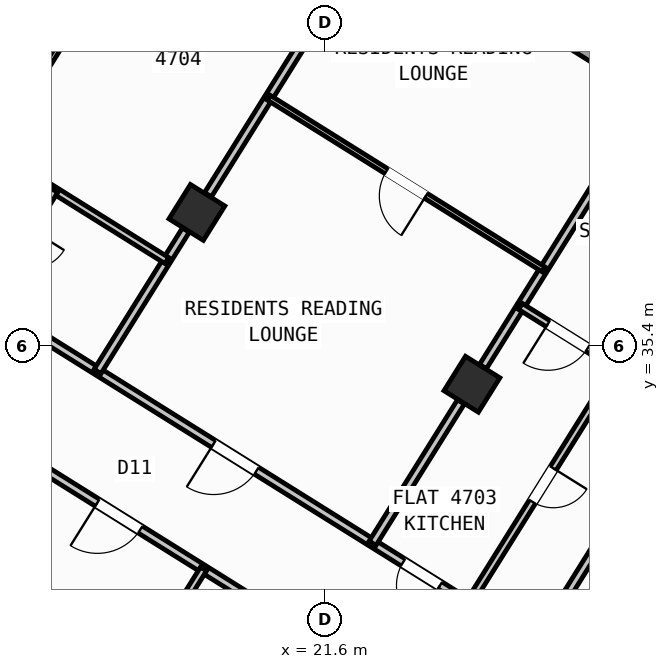
"""IFC4 building model, lengths in metres.
Left out: names, types, materials, properties, quantities, classifications, styles, units other than length and angle.
Written with IfcOpenShell. Run it as: python <this file> out.ifc"""

import sys

from ifc_helpers import new_model, si_unit, direction, frame, frame_2d, origin, origin_2d, place, context, subcontext, project, spatial, rectangle, hollow_rectangle, extrude, source, transform, mapped, element, fill, save


model = new_model("IFC4")
c1 = context("Model", 3, precision=1e-05, world=origin(), true_north=direction((0.0, 1.0)))
c2 = subcontext(c1, "Body", "Model", "MODEL_VIEW")
j1 = project(units=[si_unit("LENGTHUNIT", "METRE"), si_unit("PLANEANGLEUNIT", "RADIAN")], contexts=[c1])
p1 = place(None, origin())
s1 = spatial("IfcSite", under=j1, at=p1, CompositionType="ELEMENT")
p2 = place(p1, origin())
s2 = spatial("IfcBuilding", under=s1, at=p2, CompositionType="ELEMENT")
p3 = place(p2, frame((0.0, 0.0, 187.8)))
s3 = spatial("IfcBuildingStorey", under=s2, at=p3, CompositionType="ELEMENT", Elevation=187.8)
m1 = source(origin(), c2, "Body", "SweptSolid", [
    extrude(hollow_rectangle(XDim=0.8, YDim=0.8, WallThickness=0.032, at=origin_2d()), origin(), (0.0, 0.0, 1.0), 3.6),
])
for number, where, z_axis, x_axis in (
    (1, (24.5, 34.643, 0.0), (0.0, 0.0, 1.0), (-0.848, 0.53, 0.0)),
    (2, (19.073, 38.034, 0.0), (0.0, 0.0, 1.0), (-0.848, 0.53, 0.0)),
):
    element("IfcColumn", number, at=place(p3, frame(where, z_axis=z_axis, x_axis=x_axis)), inside=s3, PredefinedType="COLUMN", context=c2, shape_type="MappedRepresentation", body=[
        mapped(m1, transform((0.0, 0.0, 0.0), scale=1.0)),
    ])
p4 = place(p3, frame((5.7, 28.71, 0.0), z_axis=(0.0, 0.0, 1.0), x_axis=(0.529923711467, 0.8480453172, 0.0)))
e3 = element("IfcWall", 3, at=p4, inside=s3, PredefinedType="STANDARD", context=c2, shape_type="SweptSolid", body=[
    extrude(rectangle(XDim=21.587, YDim=0.32, at=frame_2d((10.794, 0.0))), origin(), (0.0, 0.0, 1.0), 2.825),
])
p5 = place(p4, frame((1.44, 0.0, 0.95)))
e4 = element("IfcOpeningElement", 4, at=p5, cuts=e3, PredefinedType="OPENING", context=c2, shape_type="SweptSolid", body=[
    extrude(rectangle(XDim=1.2, YDim=1.4, at=frame_2d((0.6, 0.7))), frame((0.0, 0.17, 0.0), z_axis=(0.0, -1.0, 0.0), x_axis=(1.0, 0.0, 0.0)), (0.0, 0.0, 1.0), 0.34),
])
p6 = place(p4, frame((4.545, 0.0, 0.85)))
e5 = element("IfcOpeningElement", 5, at=p6, cuts=e3, PredefinedType="OPENING", context=c2, shape_type="SweptSolid", body=[
    extrude(rectangle(XDim=1.8, YDim=1.5, at=frame_2d((0.9, 0.75))), frame((0.0, 0.17, 0.0), z_axis=(0.0, -1.0, 0.0), x_axis=(1.0, 0.0, 0.0)), (0.0, 0.0, 1.0), 0.34),
])
p7 = place(p4, frame((12.139, 0.0, 1.0)))
e6 = element("IfcOpeningElement", 6, at=p7, cuts=e3, PredefinedType="OPENING", context=c2, shape_type="SweptSolid", body=[
    extrude(rectangle(XDim=0.9, YDim=1.25, at=frame_2d((0.45, 0.625))), frame((0.0, 0.17, 0.0), z_axis=(0.0, -1.0, 0.0), x_axis=(1.0, 0.0, 0.0)), (0.0, 0.0, 1.0), 0.34),
])
p8 = place(p4, frame((16.35, 0.0, 0.95)))
e7 = element("IfcOpeningElement", 7, at=p8, cuts=e3, PredefinedType="OPENING", context=c2, shape_type="SweptSolid", body=[
    extrude(rectangle(XDim=1.2, YDim=1.4, at=frame_2d((0.6, 0.7))), frame((0.0, 0.17, 0.0), z_axis=(0.0, -1.0, 0.0), x_axis=(1.0, 0.0, 0.0)), (0.0, 0.0, 1.0), 0.34),
])
p9 = place(p4, frame((18.762, 0.0, 0.95)))
e8 = element("IfcOpeningElement", 8, at=p9, cuts=e3, PredefinedType="OPENING", context=c2, shape_type="SweptSolid", body=[
    extrude(rectangle(XDim=1.2, YDim=1.4, at=frame_2d((0.6, 0.7))), frame((0.0, 0.17, 0.0), z_axis=(0.0, -1.0, 0.0), x_axis=(1.0, 0.0, 0.0)), (0.0, 0.0, 1.0), 0.34),
])
p10 = place(p3, frame((17.424, 47.083, 0.0), z_axis=(0.0, 0.0, 1.0), x_axis=(0.848049927979, -0.529916332693, 0.0)))
e9 = element("IfcWall", 9, at=p10, inside=s3, PredefinedType="STANDARD", context=c2, shape_type="SweptSolid", body=[
    extrude(rectangle(XDim=29.223, YDim=0.32, at=frame_2d((14.612, 0.0))), origin(), (0.0, 0.0, 1.0), 3.35),
])
p11 = place(p10, frame((3.764, 0.0, 0.0)))
e10 = element("IfcOpeningElement", 10, at=p11, cuts=e9, PredefinedType="OPENING", context=c2, shape_type="SweptSolid", body=[
    extrude(rectangle(XDim=1.05, YDim=2.15, at=frame_2d((0.525, 1.075))), frame((0.0, 0.17, 0.0), z_axis=(0.0, -1.0, 0.0), x_axis=(1.0, 0.0, 0.0)), (0.0, 0.0, 1.0), 0.34),
])
p12 = place(p10, frame((8.344, 0.0, 0.8)))
e11 = element("IfcOpeningElement", 11, at=p12, cuts=e9, PredefinedType="OPENING", context=c2, shape_type="SweptSolid", body=[
    extrude(rectangle(XDim=2.1, YDim=1.55, at=frame_2d((1.05, 0.775))), frame((0.0, 0.17, 0.0), z_axis=(0.0, -1.0, 0.0), x_axis=(1.0, 0.0, 0.0)), (0.0, 0.0, 1.0), 0.34),
])
p13 = place(p10, frame((13.589, 0.0, 0.85)))
e12 = element("IfcOpeningElement", 12, at=p13, cuts=e9, PredefinedType="OPENING", context=c2, shape_type="SweptSolid", body=[
    extrude(rectangle(XDim=1.8, YDim=1.5, at=frame_2d((0.9, 0.75))), frame((0.0, 0.17, 0.0), z_axis=(0.0, -1.0, 0.0), x_axis=(1.0, 0.0, 0.0)), (0.0, 0.0, 1.0), 0.34),
])
p14 = place(p10, frame((17.104, 0.0, 0.95)))
e13 = element("IfcOpeningElement", 13, at=p14, cuts=e9, PredefinedType="OPENING", context=c2, shape_type="SweptSolid", body=[
    extrude(rectangle(XDim=1.2, YDim=1.4, at=frame_2d((0.6, 0.7))), frame((0.0, 0.17, 0.0), z_axis=(0.0, -1.0, 0.0), x_axis=(1.0, 0.0, 0.0)), (0.0, 0.0, 1.0), 0.34),
])
p15 = place(p10, frame((21.214, 0.0, 0.95)))
e14 = element("IfcOpeningElement", 14, at=p15, cuts=e9, PredefinedType="OPENING", context=c2, shape_type="SweptSolid", body=[
    extrude(rectangle(XDim=1.2, YDim=1.4, at=frame_2d((0.6, 0.7))), frame((0.0, 0.17, 0.0), z_axis=(0.0, -1.0, 0.0), x_axis=(1.0, 0.0, 0.0)), (0.0, 0.0, 1.0), 0.34),
])
p16 = place(p10, frame((25.853, 0.0, 0.95)))
e15 = element("IfcOpeningElement", 15, at=p16, cuts=e9, PredefinedType="OPENING", context=c2, shape_type="SweptSolid", body=[
    extrude(rectangle(XDim=1.2, YDim=1.4, at=frame_2d((0.6, 0.7))), frame((0.0, 0.17, 0.0), z_axis=(0.0, -1.0, 0.0), x_axis=(1.0, 0.0, 0.0)), (0.0, 0.0, 1.0), 0.34),
])
p17 = place(p3, frame((31.239, 38.274, 0.0), z_axis=(0.0, 0.0, 1.0), x_axis=(-0.529914125013, -0.848051307476, 0.0)))
e16 = element("IfcWall", 16, at=p17, inside=s3, PredefinedType="PARTITIONING", context=c2, shape_type="SweptSolid", body=[
    extrude(rectangle(XDim=10.35, YDim=0.16, at=frame_2d((5.175, 0.0))), origin(), (0.0, 0.0, 1.0), 3.34),
])
p18 = place(p3, frame((25.754, 29.497, 0.0), z_axis=(0.0, 0.0, 1.0), x_axis=(-0.848045850158, 0.529922858565, 0.0)))
e17 = element("IfcWall", 17, at=p18, inside=s3, PredefinedType="PARTITIONING", context=c2, shape_type="SweptSolid", body=[
    extrude(rectangle(XDim=16.73, YDim=0.16, at=frame_2d((8.365, 0.0))), origin(), (0.0, 0.0, 1.0), 3.34),
])
p19 = place(p18, frame((2.22, 0.0, 0.0)))
e18 = element("IfcOpeningElement", 18, at=p19, cuts=e17, PredefinedType="OPENING", context=c2, shape_type="SweptSolid", body=[
    extrude(rectangle(XDim=0.86, YDim=2.05, at=frame_2d((0.43, 1.025))), frame((0.0, 0.09, 0.0), z_axis=(0.0, -1.0, 0.0), x_axis=(1.0, 0.0, 0.0)), (0.0, 0.0, 1.0), 0.18),
])
p20 = place(p18, frame((6.49, 0.0, 0.0)))
e19 = element("IfcOpeningElement", 19, at=p20, cuts=e17, PredefinedType="OPENING", context=c2, shape_type="SweptSolid", body=[
    extrude(rectangle(XDim=1.0, YDim=2.1, at=frame_2d((0.5, 1.05))), frame((0.0, 0.09, 0.0), z_axis=(0.0, -1.0, 0.0), x_axis=(1.0, 0.0, 0.0)), (0.0, 0.0, 1.0), 0.18),
])
p21 = place(p18, frame((14.304, 0.0, 0.0)))
e20 = element("IfcOpeningElement", 20, at=p21, cuts=e17, PredefinedType="OPENING", context=c2, shape_type="SweptSolid", body=[
    extrude(rectangle(XDim=1.0, YDim=2.1, at=frame_2d((0.5, 1.05))), frame((0.0, 0.09, 0.0), z_axis=(0.0, -1.0, 0.0), x_axis=(1.0, 0.0, 0.0)), (0.0, 0.0, 1.0), 0.18),
])
p22 = place(p3, frame((24.588, 27.631, 0.0), z_axis=(0.0, 0.0, 1.0), x_axis=(-0.848041752158, 0.529929416617, 0.0)))
e21 = element("IfcWall", 21, at=p22, inside=s3, PredefinedType="PARTITIONING", context=c2, shape_type="SweptSolid", body=[
    extrude(rectangle(XDim=16.73, YDim=0.16, at=frame_2d((8.365, 0.0))), origin(), (0.0, 0.0, 1.0), 3.34),
])
p23 = place(p22, frame((2.22, 0.0, 0.0)))
e22 = element("IfcOpeningElement", 22, at=p23, cuts=e21, PredefinedType="OPENING", context=c2, shape_type="SweptSolid", body=[
    extrude(rectangle(XDim=0.86, YDim=2.05, at=frame_2d((0.43, 1.025))), frame((0.0, 0.09, 0.0), z_axis=(0.0, -1.0, 0.0), x_axis=(1.0, 0.0, 0.0)), (0.0, 0.0, 1.0), 0.18),
])
p24 = place(p22, frame((7.82, 0.0, 0.0)))
e23 = element("IfcOpeningElement", 23, at=p24, cuts=e21, PredefinedType="OPENING", context=c2, shape_type="SweptSolid", body=[
    extrude(rectangle(XDim=1.0, YDim=2.1, at=frame_2d((0.5, 1.05))), frame((0.0, 0.09, 0.0), z_axis=(0.0, -1.0, 0.0), x_axis=(1.0, 0.0, 0.0)), (0.0, 0.0, 1.0), 0.18),
])
p25 = place(p22, frame((12.95, 0.0, 0.0)))
e24 = element("IfcOpeningElement", 24, at=p25, cuts=e21, PredefinedType="OPENING", context=c2, shape_type="SweptSolid", body=[
    extrude(rectangle(XDim=1.0, YDim=2.1, at=frame_2d((0.5, 1.05))), frame((0.0, 0.09, 0.0), z_axis=(0.0, -1.0, 0.0), x_axis=(1.0, 0.0, 0.0)), (0.0, 0.0, 1.0), 0.18),
])
p26 = place(p3, frame((19.203, 30.996, 0.0), z_axis=(0.0, 0.0, 1.0), x_axis=(-0.529906983049, -0.848055770169, 0.0)))
e25 = element("IfcWall", 25, at=p26, inside=s3, PredefinedType="PLUMBINGWALL", context=c2, shape_type="SweptSolid", body=[
    extrude(rectangle(XDim=3.58, YDim=0.14, at=frame_2d((1.79, 0.0))), origin(), (0.0, 0.0, 1.0), 3.34),
])
p27 = place(p26, frame((1.4, 0.0, 0.0)))
e26 = element("IfcOpeningElement", 26, at=p27, cuts=e25, PredefinedType="OPENING", context=c2, shape_type="SweptSolid", body=[
    extrude(rectangle(XDim=0.78, YDim=2.05, at=frame_2d((0.39, 1.025))), frame((0.0, 0.08, 0.0), z_axis=(0.0, -1.0, 0.0), x_axis=(1.0, 0.0, 0.0)), (0.0, 0.0, 1.0), 0.16),
])
p28 = place(p3, frame((27.634, 39.657, 0.0), z_axis=(0.0, 0.0, 1.0), x_axis=(-0.529899205623, -0.848060629837, 0.0)))
e27 = element("IfcWall", 27, at=p28, inside=s3, PredefinedType="PARTITIONING", context=c2, shape_type="SweptSolid", body=[
    extrude(rectangle(XDim=5.501, YDim=0.16, at=frame_2d((2.75, 0.0))), origin(), (0.0, 0.0, 1.0), 2.825),
])
p29 = place(p3, frame((24.282, 34.293, 0.0), z_axis=(0.0, 0.0, 1.0), x_axis=(-0.529938869374, -0.84803584519, 0.0)))
e28 = element("IfcWall", 28, at=p29, inside=s3, PredefinedType="PARTITIONING", context=c2, shape_type="SweptSolid", body=[
    extrude(rectangle(XDim=3.288, YDim=0.16, at=frame_2d((1.644, 0.0))), origin(), (0.0, 0.0, 1.0), 2.825),
])
p30 = place(p3, frame((28.674, 34.169, 0.0), z_axis=(0.0, 0.0, 1.0), x_axis=(-0.848059820872, 0.529900500304, 0.0)))
e29 = element("IfcWall", 29, at=p30, inside=s3, PredefinedType="PLUMBINGWALL", context=c2, shape_type="SweptSolid", body=[
    extrude(rectangle(XDim=3.79, YDim=0.14, at=frame_2d((1.895, 0.0))), origin(), (0.0, 0.0, 1.0), 3.34),
])
p31 = place(p30, frame((2.23, 0.0, 0.0)))
e30 = element("IfcOpeningElement", 30, at=p31, cuts=e29, PredefinedType="OPENING", context=c2, shape_type="SweptSolid", body=[
    extrude(rectangle(XDim=0.92, YDim=2.08, at=frame_2d((0.46, 1.04))), frame((0.0, 0.08, 0.0), z_axis=(0.0, -1.0, 0.0), x_axis=(1.0, 0.0, 0.0)), (0.0, 0.0, 1.0), 0.16),
])
p32 = place(p3, frame((27.359, 34.991, 0.0), z_axis=(0.0, 0.0, 1.0), x_axis=(-0.529907329021, -0.848055553988, 0.0)))
e31 = element("IfcWall", 31, at=p32, inside=s3, PredefinedType="PLUMBINGWALL", context=c2, shape_type="SweptSolid", body=[
    extrude(rectangle(XDim=5.51, YDim=0.14, at=frame_2d((2.755, 0.0))), origin(), (0.0, 0.0, 1.0), 2.995),
])
p33 = place(p32, frame((2.365, 0.0, 0.0)))
e32 = element("IfcOpeningElement", 32, at=p33, cuts=e31, PredefinedType="OPENING", context=c2, shape_type="SweptSolid", body=[
    extrude(rectangle(XDim=0.78, YDim=2.05, at=frame_2d((0.39, 1.025))), frame((0.0, 0.08, 0.0), z_axis=(0.0, -1.0, 0.0), x_axis=(1.0, 0.0, 0.0)), (0.0, 0.0, 1.0), 0.16),
])
p34 = place(p3, frame((22.206, 43.049, 0.0), z_axis=(0.0, 0.0, 1.0), x_axis=(-0.529919150083, -0.848048167486, 0.0)))
e33 = element("IfcWall", 33, at=p34, inside=s3, PredefinedType="PARTITIONING", context=c2, shape_type="SweptSolid", body=[
    extrude(rectangle(XDim=5.501, YDim=0.16, at=frame_2d((2.75, 0.0))), origin(), (0.0, 0.0, 1.0), 2.825),
])
p35 = place(p3, frame((18.854, 37.685, 0.0), z_axis=(0.0, 0.0, 1.0), x_axis=(-0.529885466561, -0.848069214349, 0.0)))
e34 = element("IfcWall", 34, at=p35, inside=s3, PredefinedType="PARTITIONING", context=c2, shape_type="SweptSolid", body=[
    extrude(rectangle(XDim=3.288, YDim=0.16, at=frame_2d((1.644, 0.0))), origin(), (0.0, 0.0, 1.0), 2.825),
])
p36 = place(p3, frame((25.916, 36.909, 0.0), z_axis=(0.0, 0.0, 1.0), x_axis=(-0.848056163074, 0.529906354247, 0.0)))
e35 = element("IfcWall", 35, at=p36, inside=s3, PredefinedType="PARTITIONING", context=c2, shape_type="SweptSolid", body=[
    extrude(rectangle(XDim=6.4, YDim=0.11, at=frame_2d((3.2, 0.0))), origin(), (0.0, 0.0, 1.0), 3.34),
])
p37 = place(p36, frame((2.74, 0.0, 0.0)))
e36 = element("IfcOpeningElement", 36, at=p37, cuts=e35, PredefinedType="OPENING", context=c2, shape_type="SweptSolid", body=[
    extrude(rectangle(XDim=0.92, YDim=2.08, at=frame_2d((0.46, 1.04))), frame((0.0, 0.065, 0.0), z_axis=(0.0, -1.0, 0.0), x_axis=(1.0, 0.0, 0.0)), (0.0, 0.0, 1.0), 0.13),
])
p38 = place(p3, frame((18.479, 37.084, 0.0), z_axis=(0.0, 0.0, 1.0), x_axis=(-0.848048787466, 0.529918157905, 0.0)))
e37 = element("IfcWall", 37, at=p38, inside=s3, PredefinedType="PLUMBINGWALL", context=c2, shape_type="SweptSolid", body=[
    extrude(rectangle(XDim=6.52, YDim=0.14, at=frame_2d((3.26, 0.0))), origin(), (0.0, 0.0, 1.0), 3.34),
])
p39 = place(p38, frame((2.885, 0.0, 0.0)))
e38 = element("IfcOpeningElement", 38, at=p39, cuts=e37, PredefinedType="OPENING", context=c2, shape_type="SweptSolid", body=[
    extrude(rectangle(XDim=0.78, YDim=2.05, at=frame_2d((0.39, 1.025))), frame((0.0, 0.08, 0.0), z_axis=(0.0, -1.0, 0.0), x_axis=(1.0, 0.0, 0.0)), (0.0, 0.0, 1.0), 0.16),
])
p40 = place(p3, frame((16.268, 38.467, 0.0), z_axis=(0.0, 0.0, 1.0), x_axis=(-0.529913878929, -0.848051461244, 0.0)))
e39 = element("IfcWall", 39, at=p40, inside=s3, PredefinedType="PLUMBINGWALL", context=c2, shape_type="SweptSolid", body=[
    extrude(rectangle(XDim=2.58, YDim=0.14, at=frame_2d((1.29, 0.0))), origin(), (0.0, 0.0, 1.0), 3.34),
])
p41 = place(p40, frame((0.9, 0.0, 0.0)))
e40 = element("IfcOpeningElement", 40, at=p41, cuts=e39, PredefinedType="OPENING", context=c2, shape_type="SweptSolid", body=[
    extrude(rectangle(XDim=0.78, YDim=2.05, at=frame_2d((0.39, 1.025))), frame((0.0, 0.08, 0.0), z_axis=(0.0, -1.0, 0.0), x_axis=(1.0, 0.0, 0.0)), (0.0, 0.0, 1.0), 0.16),
])
p42 = place(p3, frame((19.312, 46.045, 0.0), z_axis=(0.0, 0.0, 1.0), x_axis=(-0.529933431478, -0.848039243315, 0.0)))
e41 = element("IfcWall", 41, at=p42, inside=s3, PredefinedType="PARTITIONING", context=c2, shape_type="SweptSolid", body=[
    extrude(rectangle(XDim=8.04, YDim=0.11, at=frame_2d((4.02, 0.0))), origin(), (0.0, 0.0, 1.0), 2.995),
])
p43 = place(p42, frame((0.47, 0.0, 0.0)))
e42 = element("IfcOpeningElement", 42, at=p43, cuts=e41, PredefinedType="OPENING", context=c2, shape_type="SweptSolid", body=[
    extrude(rectangle(XDim=0.92, YDim=2.08, at=frame_2d((0.46, 1.04))), frame((0.0, 0.065, 0.0), z_axis=(0.0, -1.0, 0.0), x_axis=(1.0, 0.0, 0.0)), (0.0, 0.0, 1.0), 0.13),
])
m2 = source(origin(), c2, "Body", "SweptSolid", [
    extrude(rectangle(XDim=1.0, YDim=2.1, at=frame_2d((0.5, 1.05))), frame((0.0, 0.025, 0.0), z_axis=(0.0, -1.0, 0.0), x_axis=(1.0, 0.0, 0.0)), (0.0, 0.0, 1.0), 0.05),
])
p44 = place(p24, origin())
e43 = element("IfcDoor", 43, at=p44, inside=s3, OperationType="SINGLE_SWING_RIGHT", PredefinedType="DOOR", context=c2, shape_type="MappedRepresentation", body=[
    mapped(m2, transform((0.0, 0.0, 0.0), scale=1.0)),
])
fill(e23, e43)
m3 = source(origin(), c2, "Body", "SweptSolid", [
    extrude(rectangle(XDim=0.86, YDim=2.05, at=frame_2d((0.43, 1.025))), frame((0.0, 0.025, 0.0), z_axis=(0.0, -1.0, 0.0), x_axis=(1.0, 0.0, 0.0)), (0.0, 0.0, 1.0), 0.05),
])
p45 = place(p19, origin())
e44 = element("IfcDoor", 44, at=p45, inside=s3, OperationType="SINGLE_SWING_LEFT", PredefinedType="DOOR", context=c2, shape_type="MappedRepresentation", body=[
    mapped(m3, transform((0.0, 0.0, 0.0), scale=1.0)),
])
fill(e18, e44)
m4 = source(origin(), c2, "Body", "SweptSolid", [
    extrude(rectangle(XDim=0.92, YDim=2.08, at=frame_2d((0.46, 1.04))), frame((0.0, 0.025, 0.0), z_axis=(0.0, -1.0, 0.0), x_axis=(1.0, 0.0, 0.0)), (0.0, 0.0, 1.0), 0.05),
])
p46 = place(p31, origin())
e45 = element("IfcDoor", 45, at=p46, inside=s3, OperationType="SINGLE_SWING_RIGHT", PredefinedType="DOOR", context=c2, shape_type="MappedRepresentation", body=[
    mapped(m4, transform((0.0, 0.0, 0.0), scale=1.0)),
])
fill(e30, e45)
m5 = source(origin(), c2, "Body", "SweptSolid", [
    extrude(rectangle(XDim=0.78, YDim=2.05, at=frame_2d((0.39, 1.025))), frame((0.0, 0.025, 0.0), z_axis=(0.0, -1.0, 0.0), x_axis=(1.0, 0.0, 0.0)), (0.0, 0.0, 1.0), 0.05),
])
p47 = place(p33, origin())
e46 = element("IfcDoor", 46, at=p47, inside=s3, OperationType="SINGLE_SWING_LEFT", PredefinedType="DOOR", context=c2, shape_type="MappedRepresentation", body=[
    mapped(m5, transform((0.0, 0.0, 0.0), scale=1.0)),
])
fill(e32, e46)
p48 = place(p20, origin())
e47 = element("IfcDoor", 47, at=p48, inside=s3, OperationType="SINGLE_SWING_RIGHT", PredefinedType="DOOR", context=c2, shape_type="MappedRepresentation", body=[
    mapped(m2, transform((0.0, 0.0, 0.0), scale=1.0)),
])
fill(e19, e47)
p49 = place(p37, origin())
e48 = element("IfcDoor", 48, at=p49, inside=s3, OperationType="SINGLE_SWING_LEFT", PredefinedType="DOOR", context=c2, shape_type="MappedRepresentation", body=[
    mapped(m4, transform((0.0, 0.0, 0.0), scale=1.0)),
])
fill(e36, e48)
save(model, sys.argv[1])
